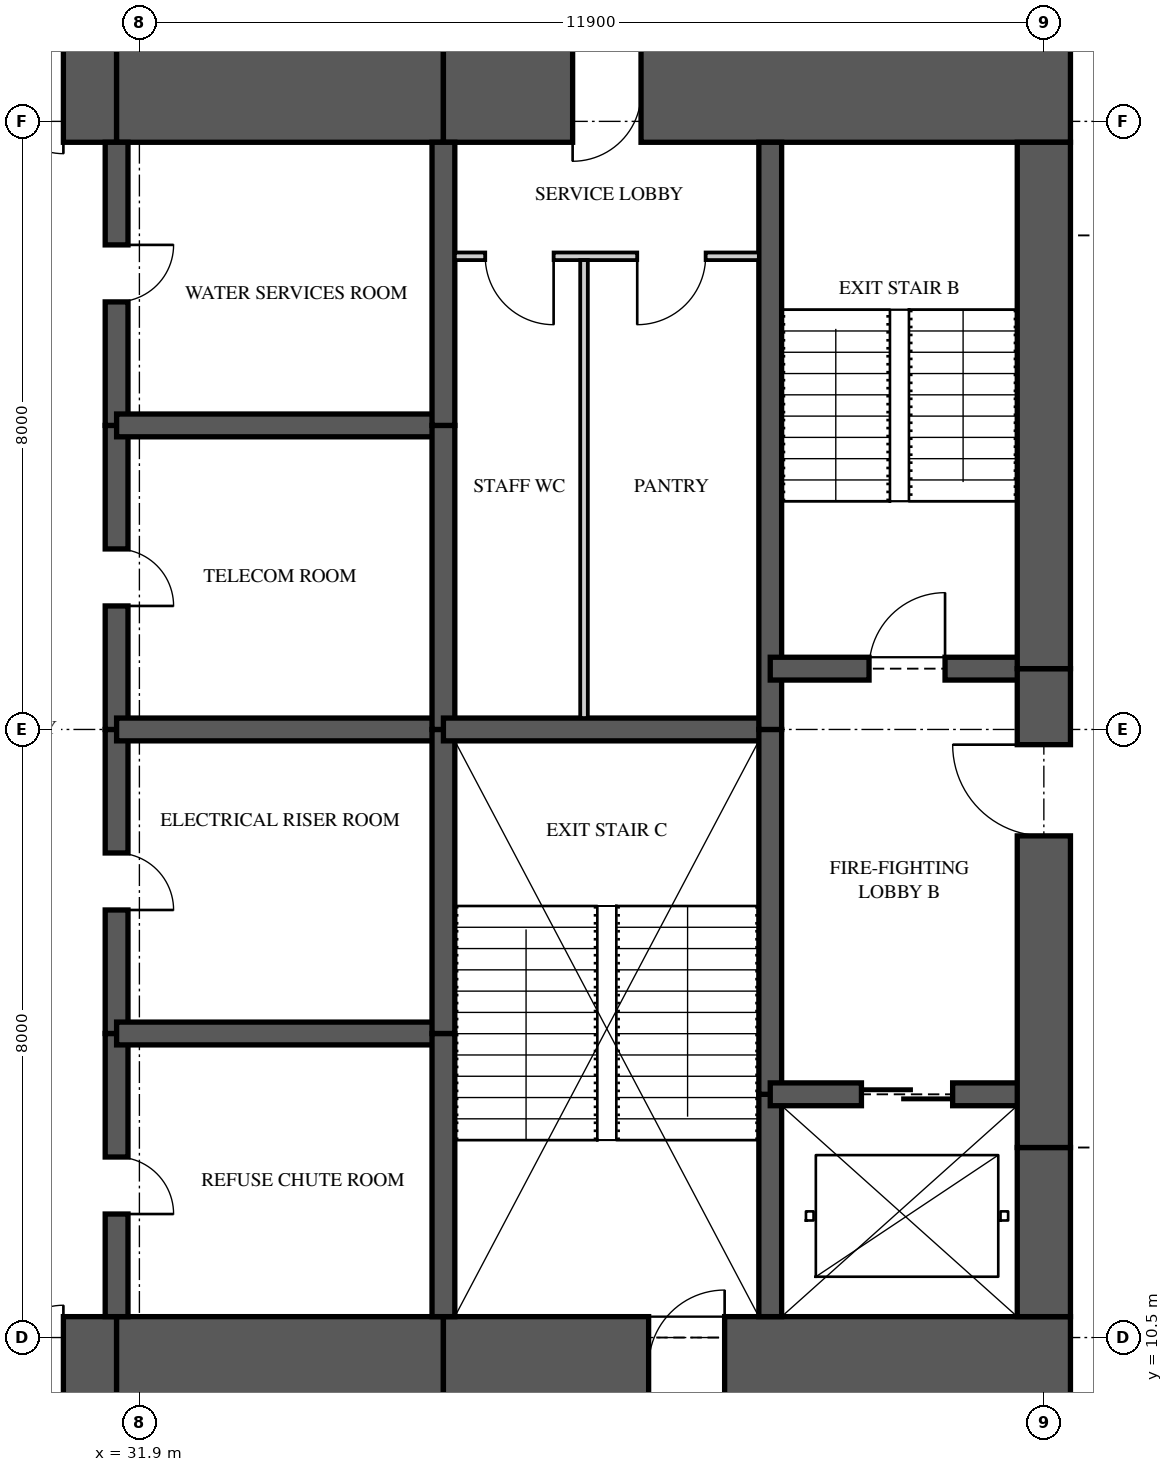
"""IFC4 building model, lengths in metres.
Left out: names, types, materials, properties, quantities, classifications, styles, units other than length and angle.
Written with IfcOpenShell. Run it as: python <this file> out.ifc"""

import sys

from ifc_helpers import new_model, si_unit, direction, frame, frame_2d, origin, place, context, subcontext, project, spatial, rectangle, extrude, element, fill, save


model = new_model("IFC4")
c1 = context("Model", 3, precision=1e-05, world=origin(), true_north=direction((0.0, 1.0)))
c2 = subcontext(c1, "Body", "Model", "MODEL_VIEW")
j1 = project(units=[si_unit("LENGTHUNIT", "METRE"), si_unit("PLANEANGLEUNIT", "RADIAN")], contexts=[c1])
p1 = place(None, origin())
s1 = spatial("IfcSite", under=j1, at=p1, CompositionType="ELEMENT")
p2 = place(p1, origin())
s2 = spatial("IfcBuilding", under=s1, at=p2, CompositionType="ELEMENT")
p3 = place(p2, frame((0.0, 0.0, 191.2)))
s3 = spatial("IfcBuildingStorey", under=s2, at=p3, CompositionType="ELEMENT", Elevation=191.2)
p4 = place(p3, frame((26.0, 10.125, 0.0), z_axis=(0.0, 0.0, 1.0), x_axis=(1.0, 0.0, 0.0)))
e1 = element("IfcWall", 1, at=p4, inside=s3, PredefinedType="SHEAR", context=c2, shape_type="SweptSolid", body=[
    extrude(rectangle(XDim=5.6, YDim=1.3, at=frame_2d((2.8, 0.0))), origin(), (0.0, 0.0, 1.0), 3.35),
])
p5 = place(p4, frame((3.3, 0.0, 0.0)))
e2 = element("IfcOpeningElement", 2, at=p5, cuts=e1, PredefinedType="OPENING", context=c2, shape_type="SweptSolid", body=[
    extrude(rectangle(XDim=1.6, YDim=2.1, at=frame_2d((0.8, 1.05))), frame((0.0, 0.66, 0.0), z_axis=(0.0, -1.0, 0.0), x_axis=(1.0, 0.0, 0.0)), (0.0, 0.0, 1.0), 1.32),
])
p6 = place(p3, frame((31.6, 10.125, 0.0), z_axis=(0.0, 0.0, 1.0), x_axis=(1.0, 0.0, 0.0)))
e3 = element("IfcWall", 3, at=p6, inside=s3, PredefinedType="SHEAR", context=c2, shape_type="SweptSolid", body=[
    extrude(rectangle(XDim=4.3, YDim=1.3, at=frame_2d((2.15, 0.0))), origin(), (0.0, 0.0, 1.0), 3.35),
])
p7 = place(p3, frame((35.9, 10.125, 0.0), z_axis=(0.0, 0.0, 1.0), x_axis=(1.0, 0.0, 0.0)))
e4 = element("IfcWall", 4, at=p7, inside=s3, PredefinedType="SHEAR", context=c2, shape_type="SweptSolid", body=[
    extrude(rectangle(XDim=8.25, YDim=1.3, at=frame_2d((4.125, 0.0))), origin(), (0.0, 0.0, 1.0), 3.35),
])
p8 = place(p7, frame((2.7, 0.0, 0.0)))
e5 = element("IfcOpeningElement", 5, at=p8, cuts=e4, PredefinedType="OPENING", context=c2, shape_type="SweptSolid", body=[
    extrude(rectangle(XDim=1.0, YDim=2.1, at=frame_2d((0.5, 1.05))), frame((0.0, 0.66, 0.0), z_axis=(0.0, -1.0, 0.0), x_axis=(1.0, 0.0, 0.0)), (0.0, 0.0, 1.0), 1.32),
])
p9 = place(p3, frame((44.15, 26.875, 0.0), z_axis=(0.0, 0.0, 1.0), x_axis=(-1.0, 0.0, 0.0)))
e6 = element("IfcWall", 6, at=p9, inside=s3, PredefinedType="SHEAR", context=c2, shape_type="SweptSolid", body=[
    extrude(rectangle(XDim=8.25, YDim=1.3, at=frame_2d((4.125, 0.0))), origin(), (0.0, 0.0, 1.0), 3.35),
])
p10 = place(p9, frame((5.65, 0.0, 0.0)))
e7 = element("IfcOpeningElement", 7, at=p10, cuts=e6, PredefinedType="OPENING", context=c2, shape_type="SweptSolid", body=[
    extrude(rectangle(XDim=0.9, YDim=2.1, at=frame_2d((0.45, 1.05))), frame((0.0, 0.66, 0.0), z_axis=(0.0, -1.0, 0.0), x_axis=(1.0, 0.0, 0.0)), (0.0, 0.0, 1.0), 1.32),
])
p11 = place(p3, frame((35.9, 26.875, 0.0), z_axis=(0.0, 0.0, 1.0), x_axis=(-1.0, 0.0, 0.0)))
e8 = element("IfcWall", 8, at=p11, inside=s3, PredefinedType="SHEAR", context=c2, shape_type="SweptSolid", body=[
    extrude(rectangle(XDim=4.3, YDim=1.3, at=frame_2d((2.15, 0.0))), origin(), (0.0, 0.0, 1.0), 3.35),
])
p12 = place(p3, frame((31.6, 26.875, 0.0), z_axis=(0.0, 0.0, 1.0), x_axis=(-1.0, 0.0, 0.0)))
e9 = element("IfcWall", 9, at=p12, inside=s3, PredefinedType="SHEAR", context=c2, shape_type="SweptSolid", body=[
    extrude(rectangle(XDim=5.6, YDim=1.3, at=frame_2d((2.8, 0.0))), origin(), (0.0, 0.0, 1.0), 3.35),
])
p13 = place(p12, frame((0.7, 0.0, 0.0)))
e10 = element("IfcOpeningElement", 10, at=p13, cuts=e9, PredefinedType="OPENING", context=c2, shape_type="SweptSolid", body=[
    extrude(rectangle(XDim=1.6, YDim=2.1, at=frame_2d((0.8, 1.05))), frame((0.0, 0.66, 0.0), z_axis=(0.0, -1.0, 0.0), x_axis=(1.0, 0.0, 0.0)), (0.0, 0.0, 1.0), 1.32),
])
p14 = place(p3, frame((43.8, 10.775, 0.0), z_axis=(0.0, 0.0, 1.0), x_axis=(0.0, 1.0, 0.0)))
e11 = element("IfcWall", 11, at=p14, inside=s3, PredefinedType="SHEAR", context=c2, shape_type="SweptSolid", body=[
    extrude(rectangle(XDim=2.225, YDim=0.7, at=frame_2d((1.113, 0.0))), origin(), (0.0, 0.0, 1.0), 3.35),
])
p15 = place(p3, frame((43.8, 13.0, 0.0), z_axis=(0.0, 0.0, 1.0), x_axis=(0.0, 1.0, 0.0)))
e12 = element("IfcWall", 12, at=p15, inside=s3, PredefinedType="SHEAR", context=c2, shape_type="SweptSolid", body=[
    extrude(rectangle(XDim=6.3, YDim=0.7, at=frame_2d((3.15, 0.0))), origin(), (0.0, 0.0, 1.0), 3.35),
])
p16 = place(p15, frame((4.1, 0.0, 0.0)))
e13 = element("IfcOpeningElement", 13, at=p16, cuts=e12, PredefinedType="OPENING", context=c2, shape_type="SweptSolid", body=[
    extrude(rectangle(XDim=1.2, YDim=2.2, at=frame_2d((0.6, 1.1))), frame((0.0, 0.36, 0.0), z_axis=(0.0, -1.0, 0.0), x_axis=(1.0, 0.0, 0.0)), (0.0, 0.0, 1.0), 0.72),
])
p17 = place(p3, frame((43.8, 19.3, 0.0), z_axis=(0.0, 0.0, 1.0), x_axis=(0.0, 1.0, 0.0)))
e14 = element("IfcWall", 14, at=p17, inside=s3, PredefinedType="SHEAR", context=c2, shape_type="SweptSolid", body=[
    extrude(rectangle(XDim=6.925, YDim=0.7, at=frame_2d((3.462, 0.0))), origin(), (0.0, 0.0, 1.0), 3.35),
])
p18 = place(p3, frame((31.6, 10.775, 0.0), z_axis=(0.0, 0.0, 1.0), x_axis=(0.0, 1.0, 0.0)))
e15 = element("IfcWall", 15, at=p18, inside=s3, PredefinedType="SHEAR", context=c2, shape_type="SweptSolid", body=[
    extrude(rectangle(XDim=3.725, YDim=0.3, at=frame_2d((1.863, 0.0))), origin(), (0.0, 0.0, 1.0), 3.35),
])
p19 = place(p18, frame((1.35, 0.0, 0.0)))
e16 = element("IfcOpeningElement", 16, at=p19, cuts=e15, PredefinedType="OPENING", context=c2, shape_type="SweptSolid", body=[
    extrude(rectangle(XDim=0.75, YDim=2.1, at=frame_2d((0.375, 1.05))), frame((0.0, 0.16, 0.0), z_axis=(0.0, -1.0, 0.0), x_axis=(1.0, 0.0, 0.0)), (0.0, 0.0, 1.0), 0.32),
])
p20 = place(p3, frame((31.6, 14.5, 0.0), z_axis=(0.0, 0.0, 1.0), x_axis=(0.0, 1.0, 0.0)))
e17 = element("IfcWall", 17, at=p20, inside=s3, PredefinedType="SHEAR", context=c2, shape_type="SweptSolid", body=[
    extrude(rectangle(XDim=4.0, YDim=0.3, at=frame_2d((2.0, 0.0))), origin(), (0.0, 0.0, 1.0), 3.35),
])
p21 = place(p20, frame((1.625, 0.0, 0.0)))
e18 = element("IfcOpeningElement", 18, at=p21, cuts=e17, PredefinedType="OPENING", context=c2, shape_type="SweptSolid", body=[
    extrude(rectangle(XDim=0.75, YDim=2.1, at=frame_2d((0.375, 1.05))), frame((0.0, 0.16, 0.0), z_axis=(0.0, -1.0, 0.0), x_axis=(1.0, 0.0, 0.0)), (0.0, 0.0, 1.0), 0.32),
])
p22 = place(p3, frame((31.6, 18.5, 0.0), z_axis=(0.0, 0.0, 1.0), x_axis=(0.0, 1.0, 0.0)))
e19 = element("IfcWall", 19, at=p22, inside=s3, PredefinedType="SHEAR", context=c2, shape_type="SweptSolid", body=[
    extrude(rectangle(XDim=4.0, YDim=0.3, at=frame_2d((2.0, 0.0))), origin(), (0.0, 0.0, 1.0), 3.35),
])
p23 = place(p22, frame((1.625, 0.0, 0.0)))
e20 = element("IfcOpeningElement", 20, at=p23, cuts=e19, PredefinedType="OPENING", context=c2, shape_type="SweptSolid", body=[
    extrude(rectangle(XDim=0.75, YDim=2.1, at=frame_2d((0.375, 1.05))), frame((0.0, 0.16, 0.0), z_axis=(0.0, -1.0, 0.0), x_axis=(1.0, 0.0, 0.0)), (0.0, 0.0, 1.0), 0.32),
])
p24 = place(p3, frame((31.6, 22.5, 0.0), z_axis=(0.0, 0.0, 1.0), x_axis=(0.0, 1.0, 0.0)))
e21 = element("IfcWall", 21, at=p24, inside=s3, PredefinedType="SHEAR", context=c2, shape_type="SweptSolid", body=[
    extrude(rectangle(XDim=3.725, YDim=0.3, at=frame_2d((1.863, 0.0))), origin(), (0.0, 0.0, 1.0), 3.35),
])
p25 = place(p24, frame((1.625, 0.0, 0.0)))
e22 = element("IfcOpeningElement", 22, at=p25, cuts=e21, PredefinedType="OPENING", context=c2, shape_type="SweptSolid", body=[
    extrude(rectangle(XDim=0.75, YDim=2.1, at=frame_2d((0.375, 1.05))), frame((0.0, 0.16, 0.0), z_axis=(0.0, -1.0, 0.0), x_axis=(1.0, 0.0, 0.0)), (0.0, 0.0, 1.0), 0.32),
])
p26 = place(p3, frame((35.9, 10.775, 0.0), z_axis=(0.0, 0.0, 1.0), x_axis=(0.0, 1.0, 0.0)))
e23 = element("IfcWall", 23, at=p26, inside=s3, PredefinedType="SHEAR", context=c2, shape_type="SweptSolid", body=[
    extrude(rectangle(XDim=3.725, YDim=0.3, at=frame_2d((1.863, 0.0))), origin(), (0.0, 0.0, 1.0), 3.35),
])
for number, where, z_axis, x_axis in (
    (24, (35.9, 14.5, 0.0), (0.0, 0.0, 1.0), (0.0, 1.0, 0.0)),
    (25, (35.9, 18.5, 0.0), (0.0, 0.0, 1.0), (0.0, 1.0, 0.0)),
):
    element("IfcWall", number, at=place(p3, frame(where, z_axis=z_axis, x_axis=x_axis)), inside=s3, PredefinedType="SHEAR", context=c2, shape_type="SweptSolid", body=[
        extrude(rectangle(XDim=4.0, YDim=0.3, at=frame_2d((2.0, 0.0))), origin(), (0.0, 0.0, 1.0), 3.35),
    ])
p27 = place(p3, frame((35.9, 22.5, 0.0), z_axis=(0.0, 0.0, 1.0), x_axis=(0.0, 1.0, 0.0)))
e26 = element("IfcWall", 26, at=p27, inside=s3, PredefinedType="SHEAR", context=c2, shape_type="SweptSolid", body=[
    extrude(rectangle(XDim=3.725, YDim=0.3, at=frame_2d((1.863, 0.0))), origin(), (0.0, 0.0, 1.0), 3.35),
])
p28 = place(p3, frame((40.2, 10.775, 0.0), z_axis=(0.0, 0.0, 1.0), x_axis=(0.0, 1.0, 0.0)))
e27 = element("IfcWall", 27, at=p28, inside=s3, PredefinedType="SHEAR", context=c2, shape_type="SweptSolid", body=[
    extrude(rectangle(XDim=2.925, YDim=0.3, at=frame_2d((1.462, 0.0))), origin(), (0.0, 0.0, 1.0), 3.35),
])
p29 = place(p3, frame((40.2, 13.7, 0.0), z_axis=(0.0, 0.0, 1.0), x_axis=(0.0, 1.0, 0.0)))
e28 = element("IfcWall", 28, at=p29, inside=s3, PredefinedType="SHEAR", context=c2, shape_type="SweptSolid", body=[
    extrude(rectangle(XDim=4.8, YDim=0.3, at=frame_2d((2.4, 0.0))), origin(), (0.0, 0.0, 1.0), 3.35),
])
p30 = place(p3, frame((40.2, 18.5, 0.0), z_axis=(0.0, 0.0, 1.0), x_axis=(0.0, 1.0, 0.0)))
e29 = element("IfcWall", 29, at=p30, inside=s3, PredefinedType="SHEAR", context=c2, shape_type="SweptSolid", body=[
    extrude(rectangle(XDim=7.725, YDim=0.3, at=frame_2d((3.863, 0.0))), origin(), (0.0, 0.0, 1.0), 3.35),
])
for number, where, z_axis, x_axis in (
    (30, (31.6, 14.5, 0.0), (0.0, 0.0, 1.0), (1.0, 0.0, 0.0)),
    (31, (31.6, 18.5, 0.0), (0.0, 0.0, 1.0), (1.0, 0.0, 0.0)),
    (32, (31.6, 22.5, 0.0), (0.0, 0.0, 1.0), (1.0, 0.0, 0.0)),
):
    element("IfcWall", number, at=place(p3, frame(where, z_axis=z_axis, x_axis=x_axis)), inside=s3, PredefinedType="SHEAR", context=c2, shape_type="SweptSolid", body=[
        extrude(rectangle(XDim=4.3, YDim=0.3, at=frame_2d((2.15, 0.0))), origin(), (0.0, 0.0, 1.0), 3.35),
    ])
p31 = place(p3, frame((35.9, 18.5, 0.0), z_axis=(0.0, 0.0, 1.0), x_axis=(1.0, 0.0, 0.0)))
e33 = element("IfcWall", 33, at=p31, inside=s3, PredefinedType="SHEAR", context=c2, shape_type="SweptSolid", body=[
    extrude(rectangle(XDim=4.3, YDim=0.3, at=frame_2d((2.15, 0.0))), origin(), (0.0, 0.0, 1.0), 3.35),
])
p32 = place(p3, frame((40.2, 13.7, 0.0), z_axis=(0.0, 0.0, 1.0), x_axis=(1.0, 0.0, 0.0)))
e34 = element("IfcWall", 34, at=p32, inside=s3, PredefinedType="SHEAR", context=c2, shape_type="SweptSolid", body=[
    extrude(rectangle(XDim=3.6, YDim=0.3, at=frame_2d((1.8, 0.0))), origin(), (0.0, 0.0, 1.0), 3.35),
])
p33 = place(p32, frame((1.2, 0.0, 0.0)))
e35 = element("IfcOpeningElement", 35, at=p33, cuts=e34, PredefinedType="OPENING", context=c2, shape_type="SweptSolid", body=[
    extrude(rectangle(XDim=1.2, YDim=2.1, at=frame_2d((0.6, 1.05))), frame((0.0, 0.16, 0.0), z_axis=(0.0, -1.0, 0.0), x_axis=(1.0, 0.0, 0.0)), (0.0, 0.0, 1.0), 0.32),
])
p34 = place(p3, frame((40.2, 19.3, 0.0), z_axis=(0.0, 0.0, 1.0), x_axis=(1.0, 0.0, 0.0)))
e36 = element("IfcWall", 36, at=p34, inside=s3, PredefinedType="SHEAR", context=c2, shape_type="SweptSolid", body=[
    extrude(rectangle(XDim=3.6, YDim=0.3, at=frame_2d((1.8, 0.0))), origin(), (0.0, 0.0, 1.0), 3.35),
])
p35 = place(p34, frame((1.3, 0.0, 0.0)))
e37 = element("IfcOpeningElement", 37, at=p35, cuts=e36, PredefinedType="OPENING", context=c2, shape_type="SweptSolid", body=[
    extrude(rectangle(XDim=1.0, YDim=2.1, at=frame_2d((0.5, 1.05))), frame((0.0, 0.16, 0.0), z_axis=(0.0, -1.0, 0.0), x_axis=(1.0, 0.0, 0.0)), (0.0, 0.0, 1.0), 0.32),
])
p36 = place(p3, frame((36.05, 24.725, 0.0), z_axis=(0.0, 0.0, 1.0), x_axis=(1.0, 0.0, 0.0)))
e38 = element("IfcWall", 38, at=p36, inside=s3, PredefinedType="PARTITIONING", context=c2, shape_type="SweptSolid", body=[
    extrude(rectangle(XDim=4.0, YDim=0.1, at=frame_2d((2.0, 0.0))), origin(), (0.0, 0.0, 1.0), 3.11),
])
p37 = place(p36, frame((0.4, 0.0, 0.0)))
e39 = element("IfcOpeningElement", 39, at=p37, cuts=e38, PredefinedType="OPENING", context=c2, shape_type="SweptSolid", body=[
    extrude(rectangle(XDim=0.9, YDim=2.1, at=frame_2d((0.45, 1.05))), frame((0.0, 0.06, 0.0), z_axis=(0.0, -1.0, 0.0), x_axis=(1.0, 0.0, 0.0)), (0.0, 0.0, 1.0), 0.12),
])
p38 = place(p36, frame((2.4, 0.0, 0.0)))
e40 = element("IfcOpeningElement", 40, at=p38, cuts=e38, PredefinedType="OPENING", context=c2, shape_type="SweptSolid", body=[
    extrude(rectangle(XDim=0.9, YDim=2.1, at=frame_2d((0.45, 1.05))), frame((0.0, 0.06, 0.0), z_axis=(0.0, -1.0, 0.0), x_axis=(1.0, 0.0, 0.0)), (0.0, 0.0, 1.0), 0.12),
])
p39 = place(p3, frame((37.75, 18.65, 0.0), z_axis=(0.0, 0.0, 1.0), x_axis=(0.0, 1.0, 0.0)))
e41 = element("IfcWall", 41, at=p39, inside=s3, PredefinedType="PARTITIONING", context=c2, shape_type="SweptSolid", body=[
    extrude(rectangle(XDim=6.025, YDim=0.1, at=frame_2d((3.013, 0.0))), origin(), (0.0, 0.0, 1.0), 3.11),
])
p40 = place(p37, frame((0.9, 0.0, 0.0), z_axis=(0.0, 0.0, 1.0), x_axis=(-1.0, 0.0, 0.0)))
e42 = element("IfcDoor", 42, at=p40, inside=s3, OperationType="SINGLE_SWING_LEFT", PredefinedType="DOOR", context=c2, shape_type="SweptSolid", body=[
    extrude(rectangle(XDim=0.9, YDim=2.1, at=frame_2d((0.45, 1.05))), frame((0.0, 0.025, 0.0), z_axis=(0.0, -1.0, 0.0), x_axis=(1.0, 0.0, 0.0)), (0.0, 0.0, 1.0), 0.05),
])
fill(e39, e42)
p41 = place(p38, frame((0.9, 0.0, 0.0), z_axis=(0.0, 0.0, 1.0), x_axis=(-1.0, 0.0, 0.0)))
e43 = element("IfcDoor", 43, at=p41, inside=s3, OperationType="SINGLE_SWING_RIGHT", PredefinedType="DOOR", context=c2, shape_type="SweptSolid", body=[
    extrude(rectangle(XDim=0.9, YDim=2.1, at=frame_2d((0.45, 1.05))), frame((0.0, 0.025, 0.0), z_axis=(0.0, -1.0, 0.0), x_axis=(1.0, 0.0, 0.0)), (0.0, 0.0, 1.0), 0.05),
])
fill(e40, e43)
p42 = place(p35, origin())
e44 = element("IfcDoor", 44, at=p42, inside=s3, OperationType="SINGLE_SWING_RIGHT", PredefinedType="DOOR", context=c2, shape_type="SweptSolid", body=[
    extrude(rectangle(XDim=1.0, YDim=2.1, at=frame_2d((0.5, 1.05))), frame((0.0, 0.025, 0.0), z_axis=(0.0, -1.0, 0.0), x_axis=(1.0, 0.0, 0.0)), (0.0, 0.0, 1.0), 0.05),
])
fill(e37, e44)
p43 = place(p16, origin())
e45 = element("IfcDoor", 45, at=p43, inside=s3, OperationType="SINGLE_SWING_RIGHT", PredefinedType="DOOR", context=c2, shape_type="SweptSolid", body=[
    extrude(rectangle(XDim=1.2, YDim=2.2, at=frame_2d((0.6, 1.1))), frame((0.0, 0.025, 0.0), z_axis=(0.0, -1.0, 0.0), x_axis=(1.0, 0.0, 0.0)), (0.0, 0.0, 1.0), 0.05),
])
fill(e13, e45)
p44 = place(p33, origin())
e46 = element("IfcDoor", 46, at=p44, inside=s3, OperationType="SLIDING_TO_LEFT", PredefinedType="DOOR", context=c2, shape_type="SweptSolid", body=[
    extrude(rectangle(XDim=1.2, YDim=2.1, at=frame_2d((0.6, 1.05))), frame((0.0, 0.025, 0.0), z_axis=(0.0, -1.0, 0.0), x_axis=(1.0, 0.0, 0.0)), (0.0, 0.0, 1.0), 0.05),
])
fill(e35, e46)
p45 = place(p5, origin())
e47 = element("IfcDoor", 47, at=p45, inside=s3, OperationType="DOUBLE_DOOR_SINGLE_SWING", PredefinedType="DOOR", context=c2, shape_type="SweptSolid", body=[
    extrude(rectangle(XDim=1.6, YDim=2.1, at=frame_2d((0.8, 1.05))), frame((0.0, 0.025, 0.0), z_axis=(0.0, -1.0, 0.0), x_axis=(1.0, 0.0, 0.0)), (0.0, 0.0, 1.0), 0.05),
])
fill(e2, e47)
p46 = place(p13, origin())
e48 = element("IfcDoor", 48, at=p46, inside=s3, OperationType="DOUBLE_DOOR_SINGLE_SWING", PredefinedType="DOOR", context=c2, shape_type="SweptSolid", body=[
    extrude(rectangle(XDim=1.6, YDim=2.1, at=frame_2d((0.8, 1.05))), frame((0.0, 0.025, 0.0), z_axis=(0.0, -1.0, 0.0), x_axis=(1.0, 0.0, 0.0)), (0.0, 0.0, 1.0), 0.05),
])
fill(e10, e48)
p47 = place(p19, frame((0.75, 0.0, 0.0), z_axis=(0.0, 0.0, 1.0), x_axis=(-1.0, 0.0, 0.0)))
e49 = element("IfcDoor", 49, at=p47, inside=s3, OperationType="SINGLE_SWING_RIGHT", PredefinedType="DOOR", context=c2, shape_type="SweptSolid", body=[
    extrude(rectangle(XDim=0.75, YDim=2.1, at=frame_2d((0.375, 1.05))), frame((0.0, 0.025, 0.0), z_axis=(0.0, -1.0, 0.0), x_axis=(1.0, 0.0, 0.0)), (0.0, 0.0, 1.0), 0.05),
])
fill(e16, e49)
p48 = place(p21, frame((0.75, 0.0, 0.0), z_axis=(0.0, 0.0, 1.0), x_axis=(-1.0, 0.0, 0.0)))
e50 = element("IfcDoor", 50, at=p48, inside=s3, OperationType="SINGLE_SWING_RIGHT", PredefinedType="DOOR", context=c2, shape_type="SweptSolid", body=[
    extrude(rectangle(XDim=0.75, YDim=2.1, at=frame_2d((0.375, 1.05))), frame((0.0, 0.025, 0.0), z_axis=(0.0, -1.0, 0.0), x_axis=(1.0, 0.0, 0.0)), (0.0, 0.0, 1.0), 0.05),
])
fill(e18, e50)
p49 = place(p23, frame((0.75, 0.0, 0.0), z_axis=(0.0, 0.0, 1.0), x_axis=(-1.0, 0.0, 0.0)))
e51 = element("IfcDoor", 51, at=p49, inside=s3, OperationType="SINGLE_SWING_RIGHT", PredefinedType="DOOR", context=c2, shape_type="SweptSolid", body=[
    extrude(rectangle(XDim=0.75, YDim=2.1, at=frame_2d((0.375, 1.05))), frame((0.0, 0.025, 0.0), z_axis=(0.0, -1.0, 0.0), x_axis=(1.0, 0.0, 0.0)), (0.0, 0.0, 1.0), 0.05),
])
fill(e20, e51)
p50 = place(p25, frame((0.75, 0.0, 0.0), z_axis=(0.0, 0.0, 1.0), x_axis=(-1.0, 0.0, 0.0)))
e52 = element("IfcDoor", 52, at=p50, inside=s3, OperationType="SINGLE_SWING_LEFT", PredefinedType="DOOR", context=c2, shape_type="SweptSolid", body=[
    extrude(rectangle(XDim=0.75, YDim=2.1, at=frame_2d((0.375, 1.05))), frame((0.0, 0.025, 0.0), z_axis=(0.0, -1.0, 0.0), x_axis=(1.0, 0.0, 0.0)), (0.0, 0.0, 1.0), 0.05),
])
fill(e22, e52)
p51 = place(p8, origin())
e53 = element("IfcDoor", 53, at=p51, inside=s3, OperationType="SINGLE_SWING_RIGHT", PredefinedType="DOOR", context=c2, shape_type="SweptSolid", body=[
    extrude(rectangle(XDim=1.0, YDim=2.1, at=frame_2d((0.5, 1.05))), frame((0.0, 0.025, 0.0), z_axis=(0.0, -1.0, 0.0), x_axis=(1.0, 0.0, 0.0)), (0.0, 0.0, 1.0), 0.05),
])
fill(e5, e53)
p52 = place(p10, origin())
e54 = element("IfcDoor", 54, at=p52, inside=s3, OperationType="SINGLE_SWING_RIGHT", PredefinedType="DOOR", context=c2, shape_type="SweptSolid", body=[
    extrude(rectangle(XDim=0.9, YDim=2.1, at=frame_2d((0.45, 1.05))), frame((0.0, 0.47, 0.0), z_axis=(0.0, -1.0, 0.0), x_axis=(1.0, 0.0, 0.0)), (0.0, 0.0, 1.0), 0.8),
])
fill(e7, e54)
save(model, sys.argv[1])
